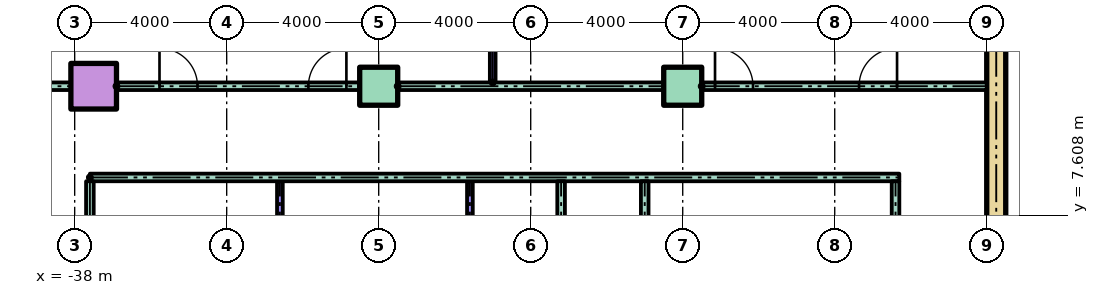
"""IFC4 building model, lengths in metres.
Left out: names, types, materials, properties, quantities, classifications, styles, units other than length and angle.
Written with IfcOpenShell. Run it as: python <this file> out.ifc"""

import sys

from ifc_helpers import new_model, si_unit, direction, frame, frame_2d, origin, origin_2d, place, context, subcontext, project, spatial, rectangle, hollow_rectangle, extrude, element, fill, save


model = new_model("IFC4")
c1 = context("Model", 3, precision=1e-05, world=origin(), true_north=direction((0.0, 1.0)))
c2 = subcontext(c1, "Body", "Model", "MODEL_VIEW")
j1 = project(units=[si_unit("LENGTHUNIT", "METRE"), si_unit("PLANEANGLEUNIT", "RADIAN")], contexts=[c1])
p1 = place(None, origin())
s1 = spatial("IfcSite", under=j1, at=p1, CompositionType="ELEMENT")
p2 = place(p1, origin())
s2 = spatial("IfcBuilding", under=s1, at=p2, CompositionType="ELEMENT")
p3 = place(p2, frame((0.0, 0.0, 10.0)))
s3 = spatial("IfcBuildingStorey", under=s2, at=p3, CompositionType="ELEMENT", Elevation=10.0)
p4 = place(p3, frame((-37.5, 11.0, 0.0)))
e1 = element("IfcColumn", 1, at=p4, inside=s3, PredefinedType="COLUMN", context=c2, shape_type="SweptSolid", body=[
    extrude(hollow_rectangle(XDim=1.2, YDim=1.2, WallThickness=0.06, at=origin_2d()), origin(), (0.0, 0.0, 1.0), 4.0),
])
for number, where in (
    (2, (-30.0, 11.0, 0.0)),
    (3, (-22.0, 11.0, 0.0)),
):
    element("IfcColumn", number, at=place(p3, frame(where)), inside=s3, PredefinedType="COLUMN", context=c2, shape_type="SweptSolid", body=[
        extrude(rectangle(XDim=1.0, YDim=1.0, at=origin_2d()), origin(), (0.0, 0.0, 1.0), 4.0),
    ])
p5 = place(p3, frame((-13.75, 3.0, 0.0), z_axis=(0.0, 0.0, 1.0), x_axis=(0.0, 1.0, 0.0)))
e4 = element("IfcWall", 4, at=p5, inside=s3, PredefinedType="SHEAR", context=c2, shape_type="SweptSolid", body=[
    extrude(rectangle(XDim=17.0, YDim=0.5, at=frame_2d((8.5, 0.0))), origin(), (0.0, 0.0, 1.0), 3.7),
])
p6 = place(p3, frame((-37.6, 8.6, 0.0)))
e5 = element("IfcWall", 5, at=p6, inside=s3, PredefinedType="PARTITIONING", context=c2, shape_type="SweptSolid", body=[
    extrude(rectangle(XDim=21.3, YDim=0.2, at=frame_2d((10.65, 0.0))), origin(), (0.0, 0.0, 1.0), 3.7),
])
p7 = place(p3, frame((-39.6, 11.0, 0.0)))
e6 = element("IfcWall", 6, at=p7, inside=s3, PredefinedType="PARTITIONING", context=c2, shape_type="SweptSolid", body=[
    extrude(rectangle(XDim=1.5, YDim=0.2, at=frame_2d((0.75, 0.0))), origin(), (0.0, 0.0, 1.0), 3.7),
])
p8 = place(p3, frame((-36.9, 11.0, 0.0)))
e7 = element("IfcWall", 7, at=p8, inside=s3, PredefinedType="PARTITIONING", context=c2, shape_type="SweptSolid", body=[
    extrude(rectangle(XDim=6.4, YDim=0.2, at=frame_2d((3.2, 0.0))), origin(), (0.0, 0.0, 1.0), 3.7),
])
p9 = place(p8, frame((1.132, 0.0, 0.0)))
e8 = element("IfcOpeningElement", 8, at=p9, cuts=e7, PredefinedType="OPENING", context=c2, shape_type="SweptSolid", body=[
    extrude(rectangle(XDim=1.0, YDim=2.1, at=frame_2d((0.5, 1.05))), frame((0.0, 0.11, 0.0), z_axis=(0.0, -1.0, 0.0), x_axis=(1.0, 0.0, 0.0)), (0.0, 0.0, 1.0), 0.22),
])
p10 = place(p8, frame((5.05, 0.0, 0.0)))
e9 = element("IfcOpeningElement", 9, at=p10, cuts=e7, PredefinedType="OPENING", context=c2, shape_type="SweptSolid", body=[
    extrude(rectangle(XDim=1.0, YDim=2.1, at=frame_2d((0.5, 1.05))), frame((0.0, 0.11, 0.0), z_axis=(0.0, -1.0, 0.0), x_axis=(1.0, 0.0, 0.0)), (0.0, 0.0, 1.0), 0.22),
])
p11 = place(p3, frame((-29.5, 11.0, 0.0)))
e10 = element("IfcWall", 10, at=p11, inside=s3, PredefinedType="PARTITIONING", context=c2, shape_type="SweptSolid", body=[
    extrude(rectangle(XDim=7.0, YDim=0.2, at=frame_2d((3.5, 0.0))), origin(), (0.0, 0.0, 1.0), 3.7),
])
p12 = place(p3, frame((-21.5, 11.0, 0.0)))
e11 = element("IfcWall", 11, at=p12, inside=s3, PredefinedType="PARTITIONING", context=c2, shape_type="SweptSolid", body=[
    extrude(rectangle(XDim=7.5, YDim=0.2, at=frame_2d((3.75, 0.0))), origin(), (0.0, 0.0, 1.0), 3.7),
])
p13 = place(p12, frame((0.35, 0.0, 0.0)))
e12 = element("IfcOpeningElement", 12, at=p13, cuts=e11, PredefinedType="OPENING", context=c2, shape_type="SweptSolid", body=[
    extrude(rectangle(XDim=1.0, YDim=2.1, at=frame_2d((0.5, 1.05))), frame((0.0, 0.11, 0.0), z_axis=(0.0, -1.0, 0.0), x_axis=(1.0, 0.0, 0.0)), (0.0, 0.0, 1.0), 0.22),
])
p14 = place(p12, frame((4.14, 0.0, 0.0)))
e13 = element("IfcOpeningElement", 13, at=p14, cuts=e11, PredefinedType="OPENING", context=c2, shape_type="SweptSolid", body=[
    extrude(rectangle(XDim=1.0, YDim=2.1, at=frame_2d((0.5, 1.05))), frame((0.0, 0.11, 0.0), z_axis=(0.0, -1.0, 0.0), x_axis=(1.0, 0.0, 0.0)), (0.0, 0.0, 1.0), 0.22),
])
p15 = place(p3, frame((-37.6, 2.6, 0.0), z_axis=(0.0, 0.0, 1.0), x_axis=(0.0, 1.0, 0.0)))
e14 = element("IfcWall", 14, at=p15, inside=s3, PredefinedType="PARTITIONING", context=c2, shape_type="SweptSolid", body=[
    extrude(rectangle(XDim=5.9, YDim=0.2, at=frame_2d((2.95, 0.0))), origin(), (0.0, 0.0, 1.0), 3.7),
])
for number, where, z_axis, x_axis in (
    (15, (-32.6, 1.5, 0.0), (0.0, 0.0, 1.0), (0.0, 1.0, 0.0)),
    (16, (-27.6, 1.5, 0.0), (0.0, 0.0, 1.0), (0.0, 1.0, 0.0)),
):
    element("IfcWall", number, at=place(p3, frame(where, z_axis=z_axis, x_axis=x_axis)), inside=s3, PredefinedType="PARTITIONING", context=c2, shape_type="SweptSolid", body=[
        extrude(rectangle(XDim=7.0, YDim=0.15, at=frame_2d((3.5, 0.0))), origin(), (0.0, 0.0, 1.0), 3.7),
    ])
p16 = place(p3, frame((-27.0, 11.1, 0.0), z_axis=(0.0, 0.0, 1.0), x_axis=(0.0, 1.0, 0.0)))
e17 = element("IfcWall", 17, at=p16, inside=s3, PredefinedType="PARTITIONING", context=c2, shape_type="SweptSolid", body=[
    extrude(rectangle(XDim=8.5, YDim=0.15, at=frame_2d((4.25, 0.0))), origin(), (0.0, 0.0, 1.0), 3.7),
])
for number, where, z_axis, x_axis in (
    (18, (-25.2, 1.5, 0.0), (0.0, 0.0, 1.0), (0.0, 1.0, 0.0)),
    (19, (-23.0, 1.5, 0.0), (0.0, 0.0, 1.0), (0.0, 1.0, 0.0)),
):
    element("IfcWall", number, at=place(p3, frame(where, z_axis=z_axis, x_axis=x_axis)), inside=s3, PredefinedType="PARTITIONING", context=c2, shape_type="SweptSolid", body=[
        extrude(rectangle(XDim=7.0, YDim=0.2, at=frame_2d((3.5, 0.0))), origin(), (0.0, 0.0, 1.0), 3.7),
    ])
p17 = place(p3, frame((-16.4, 1.5, 0.0), z_axis=(0.0, 0.0, 1.0), x_axis=(0.0, 1.0, 0.0)))
e20 = element("IfcWall", 20, at=p17, inside=s3, PredefinedType="PARTITIONING", context=c2, shape_type="SweptSolid", body=[
    extrude(rectangle(XDim=7.0, YDim=0.2, at=frame_2d((3.5, 0.0))), origin(), (0.0, 0.0, 1.0), 3.7),
])
p18 = place(p17, frame((3.05, 0.0, 0.0)))
e21 = element("IfcOpeningElement", 21, at=p18, cuts=e20, PredefinedType="OPENING", context=c2, shape_type="SweptSolid", body=[
    extrude(rectangle(XDim=0.9, YDim=2.1, at=frame_2d((0.45, 1.05))), frame((0.0, 0.11, 0.0), z_axis=(0.0, -1.0, 0.0), x_axis=(1.0, 0.0, 0.0)), (0.0, 0.0, 1.0), 0.22),
])
p19 = place(p9, origin())
e22 = element("IfcDoor", 22, at=p19, inside=s3, OperationType="SINGLE_SWING_LEFT", PredefinedType="DOOR", context=c2, shape_type="SweptSolid", body=[
    extrude(rectangle(XDim=1.0, YDim=2.1, at=frame_2d((0.5, 1.05))), frame((0.0, 0.025, 0.0), z_axis=(0.0, -1.0, 0.0), x_axis=(1.0, 0.0, 0.0)), (0.0, 0.0, 1.0), 0.05),
])
fill(e8, e22)
p20 = place(p10, origin())
e23 = element("IfcDoor", 23, at=p20, inside=s3, OperationType="SINGLE_SWING_RIGHT", PredefinedType="DOOR", context=c2, shape_type="SweptSolid", body=[
    extrude(rectangle(XDim=1.0, YDim=2.1, at=frame_2d((0.5, 1.05))), frame((0.0, 0.025, 0.0), z_axis=(0.0, -1.0, 0.0), x_axis=(1.0, 0.0, 0.0)), (0.0, 0.0, 1.0), 0.05),
])
fill(e9, e23)
p21 = place(p13, origin())
e24 = element("IfcDoor", 24, at=p21, inside=s3, OperationType="SINGLE_SWING_LEFT", PredefinedType="DOOR", context=c2, shape_type="SweptSolid", body=[
    extrude(rectangle(XDim=1.0, YDim=2.1, at=frame_2d((0.5, 1.05))), frame((0.0, 0.025, 0.0), z_axis=(0.0, -1.0, 0.0), x_axis=(1.0, 0.0, 0.0)), (0.0, 0.0, 1.0), 0.05),
])
fill(e12, e24)
p22 = place(p14, origin())
e25 = element("IfcDoor", 25, at=p22, inside=s3, OperationType="SINGLE_SWING_RIGHT", PredefinedType="DOOR", context=c2, shape_type="SweptSolid", body=[
    extrude(rectangle(XDim=1.0, YDim=2.1, at=frame_2d((0.5, 1.05))), frame((0.0, 0.025, 0.0), z_axis=(0.0, -1.0, 0.0), x_axis=(1.0, 0.0, 0.0)), (0.0, 0.0, 1.0), 0.05),
])
fill(e13, e25)
save(model, sys.argv[1])
